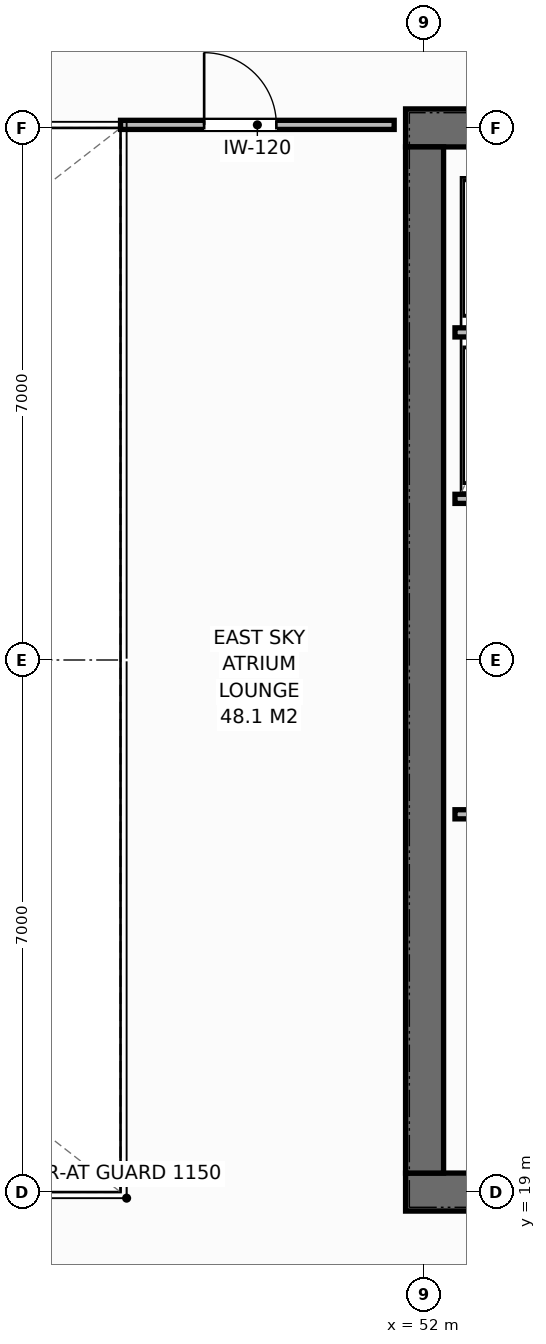
"""IFC4 building model, lengths in metres.
Left out: names, types, materials, properties, quantities, classifications, styles, units other than length and angle.
Written with IfcOpenShell. Run it as: python <this file> out.ifc"""

import sys

from ifc_helpers import new_model, si_unit, direction, frame, frame_2d, origin, place, context, subcontext, project, spatial, rectangle, extrude, element, fill, save


model = new_model("IFC4")
c1 = context("Model", 3, precision=1e-05, world=origin(), true_north=direction((0.0, 1.0)))
c2 = subcontext(c1, "Body", "Model", "MODEL_VIEW")
j1 = project(units=[si_unit("LENGTHUNIT", "METRE"), si_unit("PLANEANGLEUNIT", "RADIAN")], contexts=[c1])
p1 = place(None, origin())
s1 = spatial("IfcSite", under=j1, at=p1, CompositionType="ELEMENT")
p2 = place(p1, origin())
s2 = spatial("IfcBuilding", under=s1, at=p2, CompositionType="ELEMENT")
p3 = place(p2, frame((0.0, 0.0, 267.0)))
s3 = spatial("IfcBuildingStorey", under=s2, at=p3, CompositionType="ELEMENT", Elevation=267.0)
p4 = place(p3, frame((51.75, 19.0, 0.0), z_axis=(0.0, 0.0, 1.0), x_axis=(1.0, 0.0, 0.0)))
e1 = element("IfcWall", 1, at=p4, inside=s3, PredefinedType="SHEAR", context=c2, shape_type="SweptSolid", body=[
    extrude(rectangle(XDim=13.5, YDim=0.5, at=frame_2d((6.75, 0.0))), origin(), (0.0, 0.0, 1.0), 3.8),
])
p5 = place(p4, frame((2.97, 0.0, 0.0)))
e2 = element("IfcOpeningElement", 2, at=p5, cuts=e1, PredefinedType="OPENING", context=c2, shape_type="SweptSolid", body=[
    extrude(rectangle(XDim=1.4, YDim=2.2, at=frame_2d((0.7, 1.1))), frame((0.0, 0.26, 0.0), z_axis=(0.0, -1.0, 0.0), x_axis=(1.0, 0.0, 0.0)), (0.0, 0.0, 1.0), 0.52),
])
p6 = place(p3, frame((51.75, 33.0, 0.0), z_axis=(0.0, 0.0, 1.0), x_axis=(1.0, 0.0, 0.0)))
e3 = element("IfcWall", 3, at=p6, inside=s3, PredefinedType="SHEAR", context=c2, shape_type="SweptSolid", body=[
    extrude(rectangle(XDim=13.5, YDim=0.5, at=frame_2d((6.75, 0.0))), origin(), (0.0, 0.0, 1.0), 3.8),
])
p7 = place(p6, frame((2.97, 0.0, 0.0)))
e4 = element("IfcOpeningElement", 4, at=p7, cuts=e3, PredefinedType="OPENING", context=c2, shape_type="SweptSolid", body=[
    extrude(rectangle(XDim=1.4, YDim=2.2, at=frame_2d((0.7, 1.1))), frame((0.0, 0.26, 0.0), z_axis=(0.0, -1.0, 0.0), x_axis=(1.0, 0.0, 0.0)), (0.0, 0.0, 1.0), 0.52),
])
p8 = place(p6, frame((10.85, 0.0, 0.0)))
e5 = element("IfcOpeningElement", 5, at=p8, cuts=e3, PredefinedType="OPENING", context=c2, shape_type="SweptSolid", body=[
    extrude(rectangle(XDim=0.9, YDim=2.15, at=frame_2d((0.45, 1.075))), frame((0.0, 0.26, 0.0), z_axis=(0.0, -1.0, 0.0), x_axis=(1.0, 0.0, 0.0)), (0.0, 0.0, 1.0), 0.52),
])
p9 = place(p6, frame((5.8, 0.0, 0.0)))
e6 = element("IfcOpeningElement", 6, at=p9, cuts=e3, PredefinedType="OPENING", context=c2, shape_type="SweptSolid", body=[
    extrude(rectangle(XDim=0.9, YDim=2.15, at=frame_2d((0.45, 1.075))), frame((0.0, 0.26, 0.0), z_axis=(0.0, -1.0, 0.0), x_axis=(1.0, 0.0, 0.0)), (0.0, 0.0, 1.0), 0.52),
])
p10 = place(p6, frame((8.2, 0.0, 0.0)))
e7 = element("IfcOpeningElement", 7, at=p10, cuts=e3, PredefinedType="OPENING", context=c2, shape_type="SweptSolid", body=[
    extrude(rectangle(XDim=0.95, YDim=2.15, at=frame_2d((0.475, 1.075))), frame((0.0, 0.26, 0.0), z_axis=(0.0, -1.0, 0.0), x_axis=(1.0, 0.0, 0.0)), (0.0, 0.0, 1.0), 0.52),
])
p11 = place(p3, frame((52.0, 19.25, 0.0), z_axis=(0.0, 0.0, 1.0), x_axis=(0.0, 1.0, 0.0)))
e8 = element("IfcWall", 8, at=p11, inside=s3, PredefinedType="SHEAR", context=c2, shape_type="SweptSolid", body=[
    extrude(rectangle(XDim=13.5, YDim=0.5, at=frame_2d((6.75, 0.0))), origin(), (0.0, 0.0, 1.0), 3.8),
])
for number, where, z_axis, x_axis in (
    (9, (52.4, 23.97, 0.0), (0.0, 0.0, 1.0), (1.0, 0.0, 0.0)),
    (10, (52.4, 28.12, 0.0), (0.0, 0.0, 1.0), (1.0, 0.0, 0.0)),
    (11, (52.4, 30.31, 0.0), (0.0, 0.0, 1.0), (1.0, 0.0, 0.0)),
):
    element("IfcWall", number, at=place(p3, frame(where, z_axis=z_axis, x_axis=x_axis)), inside=s3, PredefinedType="PARTITIONING", context=c2, shape_type="SweptSolid", body=[
        extrude(rectangle(XDim=2.2, YDim=0.12, at=frame_2d((1.1, 0.0))), origin(), (0.0, 0.0, 1.0), 3.588),
    ])
p12 = place(p3, frame((48.0, 33.04, 0.0), z_axis=(0.0, 0.0, 1.0), x_axis=(1.0, 0.0, 0.0)))
e12 = element("IfcWall", 12, at=p12, inside=s3, PredefinedType="PARTITIONING", context=c2, shape_type="SweptSolid", body=[
    extrude(rectangle(XDim=3.6, YDim=0.12, at=frame_2d((1.8, 0.0))), origin(), (0.0, 0.0, 1.0), 3.328),
])
p13 = place(p12, frame((1.1, 0.0, 0.0)))
e13 = element("IfcOpeningElement", 13, at=p13, cuts=e12, PredefinedType="OPENING", context=c2, shape_type="SweptSolid", body=[
    extrude(rectangle(XDim=0.95, YDim=2.15, at=frame_2d((0.475, 1.075))), frame((0.0, 0.07, 0.0), z_axis=(0.0, -1.0, 0.0), x_axis=(1.0, 0.0, 0.0)), (0.0, 0.0, 1.0), 0.14),
])
p14 = place(p13, origin())
e14 = element("IfcDoor", 14, at=p14, inside=s3, OperationType="SINGLE_SWING_LEFT", PredefinedType="DOOR", context=c2, shape_type="SweptSolid", body=[
    extrude(rectangle(XDim=0.95, YDim=2.15, at=frame_2d((0.475, 1.075))), frame((0.0, 0.025, 0.0), z_axis=(0.0, -1.0, 0.0), x_axis=(1.0, 0.0, 0.0)), (0.0, 0.0, 1.0), 0.05),
])
fill(e13, e14)
save(model, sys.argv[1])
